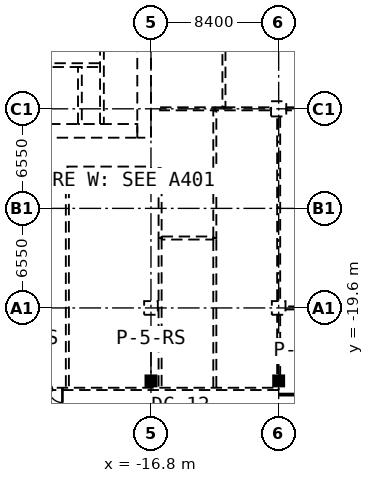
"""IFC4 building model, lengths in metres.
Left out: names, types, materials, properties, quantities, classifications, styles, units other than length and angle.
Written with IfcOpenShell. Run it as: python <this file> out.ifc"""

import sys

from ifc_helpers import new_model, si_unit, direction, frame, frame_2d, origin, origin_2d, place, context, subcontext, project, spatial, rectangle, hollow_rectangle, extrude, element, fill, save


model = new_model("IFC4")
c1 = context("Model", 3, precision=1e-05, world=origin(), true_north=direction((0.0, 1.0)))
c2 = subcontext(c1, "Body", "Model", "MODEL_VIEW")
j1 = project(units=[si_unit("LENGTHUNIT", "METRE"), si_unit("PLANEANGLEUNIT", "RADIAN")], contexts=[c1])
p1 = place(None, origin())
s1 = spatial("IfcSite", under=j1, at=p1, CompositionType="ELEMENT")
p2 = place(p1, origin())
s2 = spatial("IfcBuilding", under=s1, at=p2, CompositionType="ELEMENT")
p3 = place(p2, origin())
s3 = spatial("IfcBuildingStorey", under=s2, at=p3, CompositionType="ELEMENT", Elevation=0.0)
for number, where, z_axis, x_axis in (
    (1, (-16.8, -19.6, -0.3), (0.0, 0.0, 1.0), (1.0, 0.0, 0.0)),
    (2, (-8.4, -19.6, -0.3), (0.0, 0.0, 1.0), (1.0, 0.0, 0.0)),
):
    element("IfcColumn", number, at=place(p3, frame(where, z_axis=z_axis, x_axis=x_axis)), inside=s3, PredefinedType="COLUMN", context=c2, shape_type="SweptSolid", body=[
        extrude(hollow_rectangle(XDim=0.9, YDim=0.9, WallThickness=0.036, at=origin_2d()), origin(), (0.0, 0.0, 1.0), 8.9),
    ])
p4 = place(p3, frame((-8.4, -6.5, -0.3), z_axis=(0.0, 0.0, 1.0), x_axis=(1.0, 0.0, 0.0)))
e3 = element("IfcColumn", 3, at=p4, inside=s3, PredefinedType="COLUMN", context=c2, shape_type="SweptSolid", body=[
    extrude(hollow_rectangle(XDim=1.0, YDim=1.0, WallThickness=0.04, at=origin_2d()), origin(), (0.0, 0.0, 1.0), 8.9),
])
for number, where, z_axis, x_axis in (
    (4, (-16.8, -24.4, -0.3), (0.0, 0.0, 1.0), (1.0, 0.0, 0.0)),
    (5, (-8.4, -24.4, -0.3), (0.0, 0.0, 1.0), (1.0, 0.0, 0.0)),
):
    element("IfcColumn", number, at=place(p3, frame(where, z_axis=z_axis, x_axis=x_axis)), inside=s3, PredefinedType="COLUMN", context=c2, shape_type="SweptSolid", body=[
        extrude(hollow_rectangle(XDim=0.5, YDim=0.5, WallThickness=0.019, InnerFilletRadius=0.029, OuterFilletRadius=0.048, at=origin_2d()), origin(), (0.0, 0.0, 1.0), 8.9),
    ])
p5 = place(p3, frame((-17.25, -8.4, 0.0), z_axis=(0.0, 0.0, 1.0), x_axis=(0.0, 1.0, 0.0)))
e6 = element("IfcWall", 6, at=p5, inside=s3, PredefinedType="SHEAR", context=c2, shape_type="SweptSolid", body=[
    extrude(rectangle(XDim=16.8, YDim=0.9, at=frame_2d((8.4, 0.0))), origin(), (0.0, 0.0, 1.0), 8.6),
])
p6 = place(p5, frame((3.4, 0.0, 0.0)))
e7 = element("IfcOpeningElement", 7, at=p6, cuts=e6, PredefinedType="OPENING", context=c2, shape_type="SweptSolid", body=[
    extrude(rectangle(XDim=1.6, YDim=2.1, at=frame_2d((0.8, 1.05))), frame((0.0, 0.46, 0.0), z_axis=(0.0, -1.0, 0.0), x_axis=(1.0, 0.0, 0.0)), (0.0, 0.0, 1.0), 0.92),
])
p7 = place(p5, frame((9.6, 0.0, 0.0)))
e8 = element("IfcOpeningElement", 8, at=p7, cuts=e6, PredefinedType="OPENING", context=c2, shape_type="SweptSolid", body=[
    extrude(rectangle(XDim=1.6, YDim=2.1, at=frame_2d((0.8, 1.05))), frame((0.0, 0.46, 0.0), z_axis=(0.0, -1.0, 0.0), x_axis=(1.0, 0.0, 0.0)), (0.0, 0.0, 1.0), 0.92),
])
p8 = place(p5, frame((11.8, 0.0, 0.0)))
e9 = element("IfcOpeningElement", 9, at=p8, cuts=e6, PredefinedType="OPENING", context=c2, shape_type="SweptSolid", body=[
    extrude(rectangle(XDim=1.6, YDim=2.1, at=frame_2d((0.8, 1.05))), frame((0.0, 0.46, 0.0), z_axis=(0.0, -1.0, 0.0), x_axis=(1.0, 0.0, 0.0)), (0.0, 0.0, 1.0), 0.92),
])
p9 = place(p3, frame((-32.7, -7.95, 0.0), z_axis=(0.0, 0.0, 1.0), x_axis=(1.0, 0.0, 0.0)))
e10 = element("IfcWall", 10, at=p9, inside=s3, PredefinedType="SHEAR", context=c2, shape_type="SweptSolid", body=[
    extrude(rectangle(XDim=15.0, YDim=0.9, at=frame_2d((7.5, 0.0))), origin(), (0.0, 0.0, 1.0), 8.6),
])
p10 = place(p9, frame((11.45, 0.0, 0.0)))
e11 = element("IfcOpeningElement", 11, at=p10, cuts=e10, PredefinedType="OPENING", context=c2, shape_type="SweptSolid", body=[
    extrude(rectangle(XDim=1.0, YDim=2.1, at=frame_2d((0.5, 1.05))), frame((0.0, 0.46, 0.0), z_axis=(0.0, -1.0, 0.0), x_axis=(1.0, 0.0, 0.0)), (0.0, 0.0, 1.0), 0.92),
])
p11 = place(p9, frame((9.6, 0.0, 0.0)))
e12 = element("IfcOpeningElement", 12, at=p11, cuts=e10, PredefinedType="OPENING", context=c2, shape_type="SweptSolid", body=[
    extrude(rectangle(XDim=1.2, YDim=2.1, at=frame_2d((0.6, 1.05))), frame((0.0, 0.46, 0.0), z_axis=(0.0, -1.0, 0.0), x_axis=(1.0, 0.0, 0.0)), (0.0, 0.0, 1.0), 0.92),
])
p12 = place(p3, frame((-20.025, -7.5, 0.0), z_axis=(0.0, 0.0, 1.0), x_axis=(0.0, 1.0, 0.0)))
e13 = element("IfcWall", 13, at=p12, inside=s3, PredefinedType="SHEAR", context=c2, shape_type="SweptSolid", body=[
    extrude(rectangle(XDim=6.3, YDim=0.25, at=frame_2d((3.15, 0.0))), origin(), (0.0, 0.0, 1.0), 8.6),
])
p13 = place(p12, frame((2.4, 0.0, 0.0)))
e14 = element("IfcOpeningElement", 14, at=p13, cuts=e13, PredefinedType="OPENING", context=c2, shape_type="SweptSolid", body=[
    extrude(rectangle(XDim=1.0, YDim=2.1, at=frame_2d((0.5, 1.05))), frame((0.0, 0.135, 0.0), z_axis=(0.0, -1.0, 0.0), x_axis=(1.0, 0.0, 0.0)), (0.0, 0.0, 1.0), 0.27),
])
p14 = place(p3, frame((-27.65, -3.625, 0.0), z_axis=(0.0, 0.0, 1.0), x_axis=(1.0, 0.0, 0.0)))
e15 = element("IfcWall", 15, at=p14, inside=s3, PredefinedType="SHEAR", context=c2, shape_type="SweptSolid", body=[
    extrude(rectangle(XDim=7.5, YDim=0.25, at=frame_2d((3.75, 0.0))), origin(), (0.0, 0.0, 1.0), 8.6),
])
p15 = place(p3, frame((-21.475, -7.5, 0.0), z_axis=(0.0, 0.0, 1.0), x_axis=(0.0, 1.0, 0.0)))
e16 = element("IfcWall", 16, at=p15, inside=s3, PredefinedType="SHEAR", context=c2, shape_type="SweptSolid", body=[
    extrude(rectangle(XDim=3.75, YDim=0.25, at=frame_2d((1.875, 0.0))), origin(), (0.0, 0.0, 1.0), 8.6),
])
p16 = place(p15, frame((1.3, 0.0, 0.0)))
e17 = element("IfcOpeningElement", 17, at=p16, cuts=e16, PredefinedType="OPENING", context=c2, shape_type="SweptSolid", body=[
    extrude(rectangle(XDim=1.2, YDim=2.1, at=frame_2d((0.6, 1.05))), frame((0.0, 0.135, 0.0), z_axis=(0.0, -1.0, 0.0), x_axis=(1.0, 0.0, 0.0)), (0.0, 0.0, 1.0), 0.27),
])
p17 = place(p3, frame((-16.2, -11.5, 0.0), z_axis=(0.0, 0.0, 1.0), x_axis=(0.0, -1.0, 0.0)))
e18 = element("IfcWall", 18, at=p17, inside=s3, PredefinedType="PARTITIONING", context=c2, shape_type="SweptSolid", body=[
    extrude(rectangle(XDim=3.5, YDim=0.2, at=frame_2d((1.75, 0.0))), origin(), (0.0, 0.0, 1.0), 8.6),
])
p18 = place(p3, frame((-16.2, -10.4, 0.0), z_axis=(0.0, 0.0, 1.0), x_axis=(0.0, -1.0, 0.0)))
e19 = element("IfcWall", 19, at=p18, inside=s3, PredefinedType="PARTITIONING", context=c2, shape_type="SweptSolid", body=[
    extrude(rectangle(XDim=1.1, YDim=0.2, at=frame_2d((0.55, 0.0))), origin(), (0.0, 0.0, 1.0), 8.6),
])
p19 = place(p3, frame((-16.2, -15.0, 0.0), z_axis=(0.0, 0.0, 1.0), x_axis=(0.0, -1.0, 0.0)))
e20 = element("IfcWall", 20, at=p19, inside=s3, PredefinedType="PARTITIONING", context=c2, shape_type="SweptSolid", body=[
    extrude(rectangle(XDim=9.85, YDim=0.2, at=frame_2d((4.925, 0.0))), origin(), (0.0, 0.0, 1.0), 8.6),
])
p20 = place(p3, frame((-12.0, 6.4, 0.0), z_axis=(0.0, 0.0, 1.0), x_axis=(0.0, -1.0, 0.0)))
e21 = element("IfcWall", 21, at=p20, inside=s3, PredefinedType="PARTITIONING", context=c2, shape_type="SweptSolid", body=[
    extrude(rectangle(XDim=12.8, YDim=0.2, at=frame_2d((6.4, 0.0))), origin(), (0.0, 0.0, 1.0), 8.6),
])
p21 = place(p20, frame((5.2, 0.0, 0.0)))
e22 = element("IfcOpeningElement", 22, at=p21, cuts=e21, PredefinedType="OPENING", context=c2, shape_type="SweptSolid", body=[
    extrude(rectangle(XDim=2.4, YDim=2.1, at=frame_2d((1.2, 1.05))), frame((0.0, 0.11, 0.0), z_axis=(0.0, -1.0, 0.0), x_axis=(1.0, 0.0, 0.0)), (0.0, 0.0, 1.0), 0.22),
])
p22 = place(p3, frame((-7.9, -6.5, 0.0), z_axis=(0.0, 0.0, 1.0), x_axis=(1.0, 0.0, 0.0)))
e23 = element("IfcWall", 23, at=p22, inside=s3, PredefinedType="PARTITIONING", context=c2, shape_type="SweptSolid", body=[
    extrude(rectangle(XDim=7.4, YDim=0.2, at=frame_2d((3.7, 0.0))), origin(), (0.0, 0.0, 1.0), 8.6),
])
p23 = place(p22, frame((2.5, 0.0, 0.0)))
e24 = element("IfcOpeningElement", 24, at=p23, cuts=e23, PredefinedType="OPENING", context=c2, shape_type="SweptSolid", body=[
    extrude(rectangle(XDim=2.4, YDim=2.1, at=frame_2d((1.2, 1.05))), frame((0.0, 0.11, 0.0), z_axis=(0.0, -1.0, 0.0), x_axis=(1.0, 0.0, 0.0)), (0.0, 0.0, 1.0), 0.22),
])
p24 = place(p3, frame((-0.45, -19.6, 0.0), z_axis=(0.0, 0.0, 1.0), x_axis=(-1.0, 0.0, 0.0)))
e25 = element("IfcWall", 25, at=p24, inside=s3, PredefinedType="PARTITIONING", context=c2, shape_type="SweptSolid", body=[
    extrude(rectangle(XDim=7.5, YDim=0.2, at=frame_2d((3.75, 0.0))), origin(), (0.0, 0.0, 1.0), 8.6),
])
p25 = place(p24, frame((2.55, 0.0, 0.0)))
e26 = element("IfcOpeningElement", 26, at=p25, cuts=e25, PredefinedType="OPENING", context=c2, shape_type="SweptSolid", body=[
    extrude(rectangle(XDim=2.4, YDim=2.1, at=frame_2d((1.2, 1.05))), frame((0.0, 0.11, 0.0), z_axis=(0.0, -1.0, 0.0), x_axis=(1.0, 0.0, 0.0)), (0.0, 0.0, 1.0), 0.22),
])
p26 = place(p3, frame((-16.1, -11.5, 0.0), z_axis=(0.0, 0.0, 1.0), x_axis=(1.0, 0.0, 0.0)))
e27 = element("IfcWall", 27, at=p26, inside=s3, PredefinedType="PARTITIONING", context=c2, shape_type="SweptSolid", body=[
    extrude(rectangle(XDim=3.4, YDim=0.2, at=frame_2d((1.7, 0.0))), origin(), (0.0, 0.0, 1.0), 8.6),
])
p27 = place(p3, frame((-12.6, -6.5, 0.0), z_axis=(0.0, 0.0, 1.0), x_axis=(1.0, 0.0, 0.0)))
e28 = element("IfcWall", 28, at=p27, inside=s3, PredefinedType="PARTITIONING", context=c2, shape_type="SweptSolid", body=[
    extrude(rectangle(XDim=0.6, YDim=0.2, at=frame_2d((0.3, 0.0))), origin(), (0.0, 0.0, 1.0), 8.6),
])
p28 = place(p3, frame((-12.0, -6.5, 0.0), z_axis=(0.0, 0.0, 1.0), x_axis=(1.0, 0.0, 0.0)))
e29 = element("IfcWall", 29, at=p28, inside=s3, PredefinedType="PARTITIONING", context=c2, shape_type="SweptSolid", body=[
    extrude(rectangle(XDim=3.1, YDim=0.2, at=frame_2d((1.55, 0.0))), origin(), (0.0, 0.0, 1.0), 8.6),
])
p29 = place(p3, frame((-8.4, -7.0, 0.0), z_axis=(0.0, 0.0, 1.0), x_axis=(0.0, -1.0, 0.0)))
e30 = element("IfcWall", 30, at=p29, inside=s3, PredefinedType="PARTITIONING", context=c2, shape_type="SweptSolid", body=[
    extrude(rectangle(XDim=12.15, YDim=0.2, at=frame_2d((6.075, 0.0))), origin(), (0.0, 0.0, 1.0), 8.6),
])
p30 = place(p29, frame((8.7, 0.0, 0.0)))
e31 = element("IfcOpeningElement", 31, at=p30, cuts=e30, PredefinedType="OPENING", context=c2, shape_type="SweptSolid", body=[
    extrude(rectangle(XDim=1.2, YDim=2.1, at=frame_2d((0.6, 1.05))), frame((0.0, 0.11, 0.0), z_axis=(0.0, -1.0, 0.0), x_axis=(1.0, 0.0, 0.0)), (0.0, 0.0, 1.0), 0.22),
])
p31 = place(p3, frame((-8.4, -20.05, 0.0), z_axis=(0.0, 0.0, 1.0), x_axis=(0.0, -1.0, 0.0)))
e32 = element("IfcWall", 32, at=p31, inside=s3, PredefinedType="PARTITIONING", context=c2, shape_type="SweptSolid", body=[
    extrude(rectangle(XDim=4.1, YDim=0.2, at=frame_2d((2.05, 0.0))), origin(), (0.0, 0.0, 1.0), 8.6),
])
p32 = place(p3, frame((-12.6, -15.0, 0.0), z_axis=(0.0, 0.0, 1.0), x_axis=(0.0, 1.0, 0.0)))
e33 = element("IfcWall", 33, at=p32, inside=s3, PredefinedType="PARTITIONING", context=c2, shape_type="SweptSolid", body=[
    extrude(rectangle(XDim=3.5, YDim=0.2, at=frame_2d((1.75, 0.0))), origin(), (0.0, 0.0, 1.0), 8.6),
])
p33 = place(p32, frame((1.25, 0.0, 0.0)))
e34 = element("IfcOpeningElement", 34, at=p33, cuts=e33, PredefinedType="OPENING", context=c2, shape_type="SweptSolid", body=[
    extrude(rectangle(XDim=1.0, YDim=2.1, at=frame_2d((0.5, 1.05))), frame((0.0, 0.11, 0.0), z_axis=(0.0, -1.0, 0.0), x_axis=(1.0, 0.0, 0.0)), (0.0, 0.0, 1.0), 0.22),
])
p34 = place(p3, frame((-12.6, -11.5, 0.0), z_axis=(0.0, 0.0, 1.0), x_axis=(0.0, 1.0, 0.0)))
e35 = element("IfcWall", 35, at=p34, inside=s3, PredefinedType="PARTITIONING", context=c2, shape_type="SweptSolid", body=[
    extrude(rectangle(XDim=4.9, YDim=0.2, at=frame_2d((2.45, 0.0))), origin(), (0.0, 0.0, 1.0), 8.6),
])
p35 = place(p34, frame((2.0, 0.0, 0.0)))
e36 = element("IfcOpeningElement", 36, at=p35, cuts=e35, PredefinedType="OPENING", context=c2, shape_type="SweptSolid", body=[
    extrude(rectangle(XDim=1.0, YDim=2.1, at=frame_2d((0.5, 1.05))), frame((0.0, 0.11, 0.0), z_axis=(0.0, -1.0, 0.0), x_axis=(1.0, 0.0, 0.0)), (0.0, 0.0, 1.0), 0.22),
])
p36 = place(p3, frame((-12.6, -24.85, 0.0), z_axis=(0.0, 0.0, 1.0), x_axis=(0.0, 1.0, 0.0)))
e37 = element("IfcWall", 37, at=p36, inside=s3, PredefinedType="PARTITIONING", context=c2, shape_type="SweptSolid", body=[
    extrude(rectangle(XDim=9.85, YDim=0.2, at=frame_2d((4.925, 0.0))), origin(), (0.0, 0.0, 1.0), 8.6),
])
p37 = place(p36, frame((4.45, 0.0, 0.0)))
e38 = element("IfcOpeningElement", 38, at=p37, cuts=e37, PredefinedType="OPENING", context=c2, shape_type="SweptSolid", body=[
    extrude(rectangle(XDim=1.0, YDim=2.1, at=frame_2d((0.5, 1.05))), frame((0.0, 0.11, 0.0), z_axis=(0.0, -1.0, 0.0), x_axis=(1.0, 0.0, 0.0)), (0.0, 0.0, 1.0), 0.22),
])
p38 = place(p3, frame((-16.2, -6.5, 0.0), z_axis=(0.0, 0.0, 1.0), x_axis=(1.0, 0.0, 0.0)))
e39 = element("IfcWall", 39, at=p38, inside=s3, PredefinedType="PARTITIONING", context=c2, shape_type="SweptSolid", body=[
    extrude(rectangle(XDim=3.6, YDim=0.2, at=frame_2d((1.8, 0.0))), origin(), (0.0, 0.0, 1.0), 8.6),
])
p39 = place(p3, frame((-16.1, -15.0, 0.0), z_axis=(0.0, 0.0, 1.0), x_axis=(1.0, 0.0, 0.0)))
e40 = element("IfcWall", 40, at=p39, inside=s3, PredefinedType="PARTITIONING", context=c2, shape_type="SweptSolid", body=[
    extrude(rectangle(XDim=3.4, YDim=0.2, at=frame_2d((1.7, 0.0))), origin(), (0.0, 0.0, 1.0), 8.6),
])
p40 = place(p3, frame((-22.3, -10.5, 0.0), z_axis=(0.0, 0.0, 1.0), x_axis=(0.0, -1.0, 0.0)))
e41 = element("IfcWall", 41, at=p40, inside=s3, PredefinedType="PARTITIONING", context=c2, shape_type="SweptSolid", body=[
    extrude(rectangle(XDim=14.35, YDim=0.2, at=frame_2d((7.175, 0.0))), origin(), (0.0, 0.0, 1.0), 8.6),
])
p41 = place(p40, frame((6.675, 0.0, 0.0)))
e42 = element("IfcOpeningElement", 42, at=p41, cuts=e41, PredefinedType="OPENING", context=c2, shape_type="SweptSolid", body=[
    extrude(rectangle(XDim=1.0, YDim=2.1, at=frame_2d((0.5, 1.05))), frame((0.0, 0.11, 0.0), z_axis=(0.0, -1.0, 0.0), x_axis=(1.0, 0.0, 0.0)), (0.0, 0.0, 1.0), 0.22),
])
p42 = place(p3, frame((-16.8, -10.4, 0.0), z_axis=(0.0, 0.0, 1.0), x_axis=(-1.0, 0.0, 0.0)))
e43 = element("IfcWall", 43, at=p42, inside=s3, PredefinedType="PARTITIONING", context=c2, shape_type="SweptSolid", body=[
    extrude(rectangle(XDim=5.5, YDim=0.2, at=frame_2d((2.75, 0.0))), origin(), (0.0, 0.0, 1.0), 8.6),
])
p43 = place(p3, frame((-8.4, -24.925, 0.0), z_axis=(0.0, 0.0, 1.0), x_axis=(-1.0, 0.0, 0.0)))
e44 = element("IfcWall", 44, at=p43, inside=s3, PredefinedType="STANDARD", context=c2, shape_type="SweptSolid", body=[
    extrude(rectangle(XDim=43.58, YDim=0.15, at=frame_2d((21.79, 0.0))), origin(), (0.0, 0.0, 1.0), 8.6),
])
p44 = place(p43, frame((33.9, 0.0, 0.0)))
e45 = element("IfcOpeningElement", 45, at=p44, cuts=e44, PredefinedType="OPENING", context=c2, shape_type="SweptSolid", body=[
    extrude(rectangle(XDim=1.4, YDim=2.1, at=frame_2d((0.7, 1.05))), frame((0.0, 0.085, 0.0), z_axis=(0.0, -1.0, 0.0), x_axis=(1.0, 0.0, 0.0)), (0.0, 0.0, 1.0), 0.17),
])
p45 = place(p43, frame((14.225, 0.0, 0.0)))
e46 = element("IfcOpeningElement", 46, at=p45, cuts=e44, PredefinedType="OPENING", context=c2, shape_type="SweptSolid", body=[
    extrude(rectangle(XDim=1.8, YDim=2.1, at=frame_2d((0.9, 1.05))), frame((0.0, 0.085, 0.0), z_axis=(0.0, -1.0, 0.0), x_axis=(1.0, 0.0, 0.0)), (0.0, 0.0, 1.0), 0.17),
])
p46 = place(p6, origin())
e47 = element("IfcDoor", 47, at=p46, inside=s3, OperationType="DOUBLE_DOOR_SINGLE_SWING", PredefinedType="DOOR", context=c2, shape_type="SweptSolid", body=[
    extrude(rectangle(XDim=1.6, YDim=2.1, at=frame_2d((0.8, 1.05))), frame((0.0, 0.025, 0.0), z_axis=(0.0, -1.0, 0.0), x_axis=(1.0, 0.0, 0.0)), (0.0, 0.0, 1.0), 0.05),
])
fill(e7, e47)
p47 = place(p10, origin())
e48 = element("IfcDoor", 48, at=p47, inside=s3, OperationType="SINGLE_SWING_LEFT", PredefinedType="DOOR", context=c2, shape_type="SweptSolid", body=[
    extrude(rectangle(XDim=1.0, YDim=2.1, at=frame_2d((0.5, 1.05))), frame((0.0, 0.025, 0.0), z_axis=(0.0, -1.0, 0.0), x_axis=(1.0, 0.0, 0.0)), (0.0, 0.0, 1.0), 0.05),
])
fill(e11, e48)
p48 = place(p11, frame((1.2, 0.0, 0.0), z_axis=(0.0, 0.0, 1.0), x_axis=(-1.0, 0.0, 0.0)))
e49 = element("IfcDoor", 49, at=p48, inside=s3, OperationType="DOUBLE_DOOR_SINGLE_SWING", PredefinedType="DOOR", context=c2, shape_type="SweptSolid", body=[
    extrude(rectangle(XDim=1.2, YDim=2.1, at=frame_2d((0.6, 1.05))), frame((0.0, 0.025, 0.0), z_axis=(0.0, -1.0, 0.0), x_axis=(1.0, 0.0, 0.0)), (0.0, 0.0, 1.0), 0.05),
])
fill(e12, e49)
p49 = place(p16, origin())
e50 = element("IfcDoor", 50, at=p49, inside=s3, OperationType="DOUBLE_DOOR_SINGLE_SWING", PredefinedType="DOOR", context=c2, shape_type="SweptSolid", body=[
    extrude(rectangle(XDim=1.2, YDim=2.1, at=frame_2d((0.6, 1.05))), frame((0.0, 0.025, 0.0), z_axis=(0.0, -1.0, 0.0), x_axis=(1.0, 0.0, 0.0)), (0.0, 0.0, 1.0), 0.05),
])
fill(e17, e50)
p50 = place(p13, origin())
e51 = element("IfcDoor", 51, at=p50, inside=s3, OperationType="SINGLE_SWING_LEFT", PredefinedType="DOOR", context=c2, shape_type="SweptSolid", body=[
    extrude(rectangle(XDim=1.0, YDim=2.1, at=frame_2d((0.5, 1.05))), frame((0.0, 0.025, 0.0), z_axis=(0.0, -1.0, 0.0), x_axis=(1.0, 0.0, 0.0)), (0.0, 0.0, 1.0), 0.05),
])
fill(e14, e51)
p51 = place(p30, origin())
e52 = element("IfcDoor", 52, at=p51, inside=s3, OperationType="SINGLE_SWING_LEFT", PredefinedType="DOOR", context=c2, shape_type="SweptSolid", body=[
    extrude(rectangle(XDim=1.2, YDim=2.1, at=frame_2d((0.6, 1.05))), frame((0.0, 0.025, 0.0), z_axis=(0.0, -1.0, 0.0), x_axis=(1.0, 0.0, 0.0)), (0.0, 0.0, 1.0), 0.05),
])
fill(e31, e52)
p52 = place(p35, origin())
e53 = element("IfcDoor", 53, at=p52, inside=s3, OperationType="SINGLE_SWING_LEFT", PredefinedType="DOOR", context=c2, shape_type="SweptSolid", body=[
    extrude(rectangle(XDim=1.0, YDim=2.1, at=frame_2d((0.5, 1.05))), frame((0.0, 0.025, 0.0), z_axis=(0.0, -1.0, 0.0), x_axis=(1.0, 0.0, 0.0)), (0.0, 0.0, 1.0), 0.05),
])
fill(e36, e53)
p53 = place(p33, origin())
e54 = element("IfcDoor", 54, at=p53, inside=s3, OperationType="SINGLE_SWING_RIGHT", PredefinedType="DOOR", context=c2, shape_type="SweptSolid", body=[
    extrude(rectangle(XDim=1.0, YDim=2.1, at=frame_2d((0.5, 1.05))), frame((0.0, 0.025, 0.0), z_axis=(0.0, -1.0, 0.0), x_axis=(1.0, 0.0, 0.0)), (0.0, 0.0, 1.0), 0.05),
])
fill(e34, e54)
p54 = place(p37, origin())
e55 = element("IfcDoor", 55, at=p54, inside=s3, OperationType="SINGLE_SWING_LEFT", PredefinedType="DOOR", context=c2, shape_type="SweptSolid", body=[
    extrude(rectangle(XDim=1.0, YDim=2.1, at=frame_2d((0.5, 1.05))), frame((0.0, 0.025, 0.0), z_axis=(0.0, -1.0, 0.0), x_axis=(1.0, 0.0, 0.0)), (0.0, 0.0, 1.0), 0.05),
])
fill(e38, e55)
p55 = place(p41, origin())
e56 = element("IfcDoor", 56, at=p55, inside=s3, OperationType="SINGLE_SWING_RIGHT", PredefinedType="DOOR", context=c2, shape_type="SweptSolid", body=[
    extrude(rectangle(XDim=1.0, YDim=2.1, at=frame_2d((0.5, 1.05))), frame((0.0, 0.025, 0.0), z_axis=(0.0, -1.0, 0.0), x_axis=(1.0, 0.0, 0.0)), (0.0, 0.0, 1.0), 0.05),
])
fill(e42, e56)
p56 = place(p45, origin())
e57 = element("IfcDoor", 57, at=p56, inside=s3, OperationType="DOUBLE_DOOR_SINGLE_SWING", PredefinedType="DOOR", context=c2, shape_type="SweptSolid", body=[
    extrude(rectangle(XDim=1.8, YDim=2.1, at=frame_2d((0.9, 1.05))), frame((0.0, 0.025, 0.0), z_axis=(0.0, -1.0, 0.0), x_axis=(1.0, 0.0, 0.0)), (0.0, 0.0, 1.0), 0.05),
])
fill(e46, e57)
save(model, sys.argv[1])
